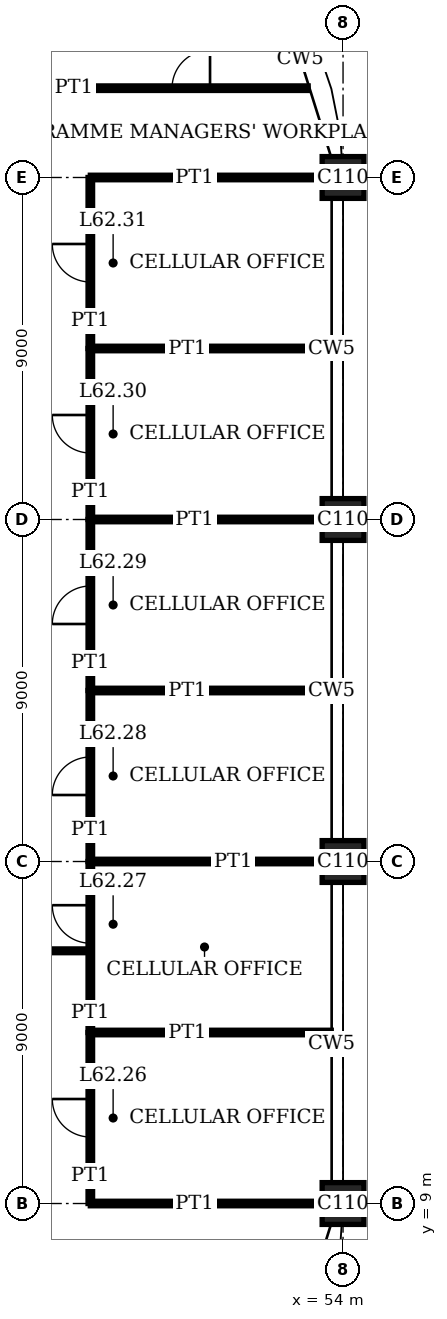
"""IFC4 building model, lengths in metres.
Left out: names, types, materials, properties, quantities, classifications, styles, units other than length and angle.
Written with IfcOpenShell. Run it as: python <this file> out.ifc"""

import sys

from ifc_helpers import new_model, si_unit, direction, frame, frame_2d, origin, origin_2d, place, context, subcontext, project, spatial, rectangle, extrude, element, fill, save


model = new_model("IFC4")
c1 = context("Model", 3, precision=1e-05, world=origin(), true_north=direction((0.0, 1.0)))
c2 = subcontext(c1, "Body", "Model", "MODEL_VIEW")
j1 = project(units=[si_unit("LENGTHUNIT", "METRE"), si_unit("PLANEANGLEUNIT", "RADIAN")], contexts=[c1])
p1 = place(None, origin())
s1 = spatial("IfcSite", under=j1, at=p1, CompositionType="ELEMENT")
p2 = place(p1, origin())
s2 = spatial("IfcBuilding", under=s1, at=p2, CompositionType="ELEMENT")
p3 = place(p2, frame((0.0, 0.0, 255.4)))
s3 = spatial("IfcBuildingStorey", under=s2, at=p3, CompositionType="ELEMENT", Elevation=255.4)
for number, where, z_axis, x_axis in (
    (1, (54.0, 9.0, 0.0), (0.0, 0.0, 1.0), (1.0, 0.0, 0.0)),
    (2, (54.0, 18.0, 0.0), (0.0, 0.0, 1.0), (1.0, 0.0, 0.0)),
    (3, (54.0, 27.0, 0.0), (0.0, 0.0, 1.0), (1.0, 0.0, 0.0)),
    (4, (54.0, 36.0, 0.0), (0.0, 0.0, 1.0), (1.0, 0.0, 0.0)),
):
    element("IfcColumn", number, at=place(p3, frame(where, z_axis=z_axis, x_axis=x_axis)), inside=s3, PredefinedType="COLUMN", context=c2, shape_type="SweptSolid", body=[
        extrude(rectangle(XDim=1.1, YDim=1.1, at=origin_2d()), origin(), (0.0, 0.0, 1.0), 4.0),
    ])
p4 = place(p3, frame((47.35, 9.0, 0.0), z_axis=(0.0, 0.0, 1.0), x_axis=(1.0, 0.0, 0.0)))
e5 = element("IfcWall", 5, at=p4, inside=s3, PredefinedType="PARTITIONING", context=c2, shape_type="SweptSolid", body=[
    extrude(rectangle(XDim=6.1, YDim=0.12, at=frame_2d((3.05, 0.0))), origin(), (0.0, 0.0, 1.0), 3.05),
])
p5 = place(p3, frame((47.35, 13.5, 0.0), z_axis=(0.0, 0.0, 1.0), x_axis=(1.0, 0.0, 0.0)))
e6 = element("IfcWall", 6, at=p5, inside=s3, PredefinedType="PARTITIONING", context=c2, shape_type="SweptSolid", body=[
    extrude(rectangle(XDim=6.34, YDim=0.12, at=frame_2d((3.17, 0.0))), origin(), (0.0, 0.0, 1.0), 3.1),
])
p6 = place(p3, frame((31.51, 15.65, 0.0), z_axis=(0.0, 0.0, 1.0), x_axis=(1.0, 0.0, 0.0)))
e7 = element("IfcWall", 7, at=p6, inside=s3, PredefinedType="PARTITIONING", context=c2, shape_type="SweptSolid", body=[
    extrude(rectangle(XDim=15.83, YDim=0.1, at=frame_2d((7.915, 0.0))), origin(), (0.0, 0.0, 1.0), 3.75),
])
p7 = place(p6, frame((7.415, 0.0, 0.0)))
e8 = element("IfcOpeningElement", 8, at=p7, cuts=e7, PredefinedType="OPENING", context=c2, shape_type="SweptSolid", body=[
    extrude(rectangle(XDim=1.0, YDim=2.4, at=frame_2d((0.5, 1.2))), frame((0.0, 0.06, 0.0), z_axis=(0.0, -1.0, 0.0), x_axis=(1.0, 0.0, 0.0)), (0.0, 0.0, 1.0), 0.12),
])
p8 = place(p3, frame((47.35, 18.0, 0.0), z_axis=(0.0, 0.0, 1.0), x_axis=(1.0, 0.0, 0.0)))
e9 = element("IfcWall", 9, at=p8, inside=s3, PredefinedType="PARTITIONING", context=c2, shape_type="SweptSolid", body=[
    extrude(rectangle(XDim=6.1, YDim=0.12, at=frame_2d((3.05, 0.0))), origin(), (0.0, 0.0, 1.0), 3.05),
])
p9 = place(p3, frame((47.35, 22.5, 0.0), z_axis=(0.0, 0.0, 1.0), x_axis=(1.0, 0.0, 0.0)))
e10 = element("IfcWall", 10, at=p9, inside=s3, PredefinedType="PARTITIONING", context=c2, shape_type="SweptSolid", body=[
    extrude(rectangle(XDim=6.34, YDim=0.12, at=frame_2d((3.17, 0.0))), origin(), (0.0, 0.0, 1.0), 3.1),
])
p10 = place(p3, frame((47.35, 27.0, 0.0), z_axis=(0.0, 0.0, 1.0), x_axis=(1.0, 0.0, 0.0)))
e11 = element("IfcWall", 11, at=p10, inside=s3, PredefinedType="PARTITIONING", context=c2, shape_type="SweptSolid", body=[
    extrude(rectangle(XDim=6.1, YDim=0.12, at=frame_2d((3.05, 0.0))), origin(), (0.0, 0.0, 1.0), 3.05),
])
p11 = place(p3, frame((47.35, 31.5, 0.0), z_axis=(0.0, 0.0, 1.0), x_axis=(1.0, 0.0, 0.0)))
e12 = element("IfcWall", 12, at=p11, inside=s3, PredefinedType="PARTITIONING", context=c2, shape_type="SweptSolid", body=[
    extrude(rectangle(XDim=6.34, YDim=0.12, at=frame_2d((3.17, 0.0))), origin(), (0.0, 0.0, 1.0), 3.1),
])
p12 = place(p3, frame((47.35, 36.0, 0.0), z_axis=(0.0, 0.0, 1.0), x_axis=(1.0, 0.0, 0.0)))
e13 = element("IfcWall", 13, at=p12, inside=s3, PredefinedType="PARTITIONING", context=c2, shape_type="SweptSolid", body=[
    extrude(rectangle(XDim=6.1, YDim=0.12, at=frame_2d((3.05, 0.0))), origin(), (0.0, 0.0, 1.0), 3.05),
])
p13 = place(p3, frame((45.0, 38.35, 0.0), z_axis=(0.0, 0.0, 1.0), x_axis=(1.0, 0.0, 0.0)))
e14 = element("IfcWall", 14, at=p13, inside=s3, PredefinedType="PARTITIONING", context=c2, shape_type="SweptSolid", body=[
    extrude(rectangle(XDim=8.082, YDim=0.12, at=frame_2d((4.041, 0.0))), origin(), (0.0, 0.0, 1.0), 3.75),
])
p14 = place(p13, frame((4.5, 0.0, 0.0)))
e15 = element("IfcOpeningElement", 15, at=p14, cuts=e14, PredefinedType="OPENING", context=c2, shape_type="SweptSolid", body=[
    extrude(rectangle(XDim=1.0, YDim=2.4, at=frame_2d((0.5, 1.2))), frame((0.0, 0.07, 0.0), z_axis=(0.0, -1.0, 0.0), x_axis=(1.0, 0.0, 0.0)), (0.0, 0.0, 1.0), 0.14),
])
p15 = place(p3, frame((47.35, 9.0, 0.0), z_axis=(0.0, 0.0, 1.0), x_axis=(0.0, 1.0, 0.0)))
e16 = element("IfcWall", 16, at=p15, inside=s3, PredefinedType="PARTITIONING", context=c2, shape_type="SweptSolid", body=[
    extrude(rectangle(XDim=4.5, YDim=0.12, at=frame_2d((2.25, 0.0))), origin(), (0.0, 0.0, 1.0), 3.75),
])
p16 = place(p15, frame((1.75, 0.0, 0.0)))
e17 = element("IfcOpeningElement", 17, at=p16, cuts=e16, PredefinedType="OPENING", context=c2, shape_type="SweptSolid", body=[
    extrude(rectangle(XDim=1.0, YDim=2.4, at=frame_2d((0.5, 1.2))), frame((0.0, 0.07, 0.0), z_axis=(0.0, -1.0, 0.0), x_axis=(1.0, 0.0, 0.0)), (0.0, 0.0, 1.0), 0.14),
])
p17 = place(p3, frame((47.35, 13.5, 0.0), z_axis=(0.0, 0.0, 1.0), x_axis=(0.0, 1.0, 0.0)))
e18 = element("IfcWall", 18, at=p17, inside=s3, PredefinedType="PARTITIONING", context=c2, shape_type="SweptSolid", body=[
    extrude(rectangle(XDim=4.5, YDim=0.12, at=frame_2d((2.25, 0.0))), origin(), (0.0, 0.0, 1.0), 3.75),
])
p18 = place(p17, frame((2.35, 0.0, 0.0)))
e19 = element("IfcOpeningElement", 19, at=p18, cuts=e18, PredefinedType="OPENING", context=c2, shape_type="SweptSolid", body=[
    extrude(rectangle(XDim=1.0, YDim=2.4, at=frame_2d((0.5, 1.2))), frame((0.0, 0.07, 0.0), z_axis=(0.0, -1.0, 0.0), x_axis=(1.0, 0.0, 0.0)), (0.0, 0.0, 1.0), 0.14),
])
p19 = place(p3, frame((47.35, 18.0, 0.0), z_axis=(0.0, 0.0, 1.0), x_axis=(0.0, 1.0, 0.0)))
e20 = element("IfcWall", 20, at=p19, inside=s3, PredefinedType="PARTITIONING", context=c2, shape_type="SweptSolid", body=[
    extrude(rectangle(XDim=4.5, YDim=0.12, at=frame_2d((2.25, 0.0))), origin(), (0.0, 0.0, 1.0), 3.75),
])
p20 = place(p19, frame((1.75, 0.0, 0.0)))
e21 = element("IfcOpeningElement", 21, at=p20, cuts=e20, PredefinedType="OPENING", context=c2, shape_type="SweptSolid", body=[
    extrude(rectangle(XDim=1.0, YDim=2.4, at=frame_2d((0.5, 1.2))), frame((0.0, 0.07, 0.0), z_axis=(0.0, -1.0, 0.0), x_axis=(1.0, 0.0, 0.0)), (0.0, 0.0, 1.0), 0.14),
])
p21 = place(p3, frame((47.35, 22.5, 0.0), z_axis=(0.0, 0.0, 1.0), x_axis=(0.0, 1.0, 0.0)))
e22 = element("IfcWall", 22, at=p21, inside=s3, PredefinedType="PARTITIONING", context=c2, shape_type="SweptSolid", body=[
    extrude(rectangle(XDim=4.5, YDim=0.12, at=frame_2d((2.25, 0.0))), origin(), (0.0, 0.0, 1.0), 3.75),
])
p22 = place(p21, frame((1.75, 0.0, 0.0)))
e23 = element("IfcOpeningElement", 23, at=p22, cuts=e22, PredefinedType="OPENING", context=c2, shape_type="SweptSolid", body=[
    extrude(rectangle(XDim=1.0, YDim=2.4, at=frame_2d((0.5, 1.2))), frame((0.0, 0.07, 0.0), z_axis=(0.0, -1.0, 0.0), x_axis=(1.0, 0.0, 0.0)), (0.0, 0.0, 1.0), 0.14),
])
p23 = place(p3, frame((47.35, 27.0, 0.0), z_axis=(0.0, 0.0, 1.0), x_axis=(0.0, 1.0, 0.0)))
e24 = element("IfcWall", 24, at=p23, inside=s3, PredefinedType="PARTITIONING", context=c2, shape_type="SweptSolid", body=[
    extrude(rectangle(XDim=4.5, YDim=0.12, at=frame_2d((2.25, 0.0))), origin(), (0.0, 0.0, 1.0), 3.75),
])
p24 = place(p23, frame((1.75, 0.0, 0.0)))
e25 = element("IfcOpeningElement", 25, at=p24, cuts=e24, PredefinedType="OPENING", context=c2, shape_type="SweptSolid", body=[
    extrude(rectangle(XDim=1.0, YDim=2.4, at=frame_2d((0.5, 1.2))), frame((0.0, 0.07, 0.0), z_axis=(0.0, -1.0, 0.0), x_axis=(1.0, 0.0, 0.0)), (0.0, 0.0, 1.0), 0.14),
])
p25 = place(p3, frame((47.35, 31.5, 0.0), z_axis=(0.0, 0.0, 1.0), x_axis=(0.0, 1.0, 0.0)))
e26 = element("IfcWall", 26, at=p25, inside=s3, PredefinedType="PARTITIONING", context=c2, shape_type="SweptSolid", body=[
    extrude(rectangle(XDim=4.5, YDim=0.12, at=frame_2d((2.25, 0.0))), origin(), (0.0, 0.0, 1.0), 3.75),
])
p26 = place(p25, frame((1.75, 0.0, 0.0)))
e27 = element("IfcOpeningElement", 27, at=p26, cuts=e26, PredefinedType="OPENING", context=c2, shape_type="SweptSolid", body=[
    extrude(rectangle(XDim=1.0, YDim=2.4, at=frame_2d((0.5, 1.2))), frame((0.0, 0.07, 0.0), z_axis=(0.0, -1.0, 0.0), x_axis=(1.0, 0.0, 0.0)), (0.0, 0.0, 1.0), 0.14),
])
p27 = place(p14, origin())
e28 = element("IfcDoor", 28, at=p27, inside=s3, OperationType="SINGLE_SWING_LEFT", PredefinedType="DOOR", context=c2, shape_type="SweptSolid", body=[
    extrude(rectangle(XDim=1.0, YDim=2.4, at=frame_2d((0.5, 1.2))), frame((0.0, 0.025, 0.0), z_axis=(0.0, -1.0, 0.0), x_axis=(1.0, 0.0, 0.0)), (0.0, 0.0, 1.0), 0.05),
])
fill(e15, e28)
p28 = place(p16, origin())
e29 = element("IfcDoor", 29, at=p28, inside=s3, OperationType="SINGLE_SWING_LEFT", PredefinedType="DOOR", context=c2, shape_type="SweptSolid", body=[
    extrude(rectangle(XDim=1.0, YDim=2.4, at=frame_2d((0.5, 1.2))), frame((0.0, 0.025, 0.0), z_axis=(0.0, -1.0, 0.0), x_axis=(1.0, 0.0, 0.0)), (0.0, 0.0, 1.0), 0.05),
])
fill(e17, e29)
p29 = place(p18, origin())
e30 = element("IfcDoor", 30, at=p29, inside=s3, OperationType="SINGLE_SWING_LEFT", PredefinedType="DOOR", context=c2, shape_type="SweptSolid", body=[
    extrude(rectangle(XDim=1.0, YDim=2.4, at=frame_2d((0.5, 1.2))), frame((0.0, 0.025, 0.0), z_axis=(0.0, -1.0, 0.0), x_axis=(1.0, 0.0, 0.0)), (0.0, 0.0, 1.0), 0.05),
])
fill(e19, e30)
p30 = place(p20, origin())
e31 = element("IfcDoor", 31, at=p30, inside=s3, OperationType="SINGLE_SWING_RIGHT", PredefinedType="DOOR", context=c2, shape_type="SweptSolid", body=[
    extrude(rectangle(XDim=1.0, YDim=2.4, at=frame_2d((0.5, 1.2))), frame((0.0, 0.025, 0.0), z_axis=(0.0, -1.0, 0.0), x_axis=(1.0, 0.0, 0.0)), (0.0, 0.0, 1.0), 0.05),
])
fill(e21, e31)
p31 = place(p22, origin())
e32 = element("IfcDoor", 32, at=p31, inside=s3, OperationType="SINGLE_SWING_RIGHT", PredefinedType="DOOR", context=c2, shape_type="SweptSolid", body=[
    extrude(rectangle(XDim=1.0, YDim=2.4, at=frame_2d((0.5, 1.2))), frame((0.0, 0.025, 0.0), z_axis=(0.0, -1.0, 0.0), x_axis=(1.0, 0.0, 0.0)), (0.0, 0.0, 1.0), 0.05),
])
fill(e23, e32)
p32 = place(p24, origin())
e33 = element("IfcDoor", 33, at=p32, inside=s3, OperationType="SINGLE_SWING_LEFT", PredefinedType="DOOR", context=c2, shape_type="SweptSolid", body=[
    extrude(rectangle(XDim=1.0, YDim=2.4, at=frame_2d((0.5, 1.2))), frame((0.0, 0.025, 0.0), z_axis=(0.0, -1.0, 0.0), x_axis=(1.0, 0.0, 0.0)), (0.0, 0.0, 1.0), 0.05),
])
fill(e25, e33)
p33 = place(p26, origin())
e34 = element("IfcDoor", 34, at=p33, inside=s3, OperationType="SINGLE_SWING_LEFT", PredefinedType="DOOR", context=c2, shape_type="SweptSolid", body=[
    extrude(rectangle(XDim=1.0, YDim=2.4, at=frame_2d((0.5, 1.2))), frame((0.0, 0.025, 0.0), z_axis=(0.0, -1.0, 0.0), x_axis=(1.0, 0.0, 0.0)), (0.0, 0.0, 1.0), 0.05),
])
fill(e27, e34)
save(model, sys.argv[1])
